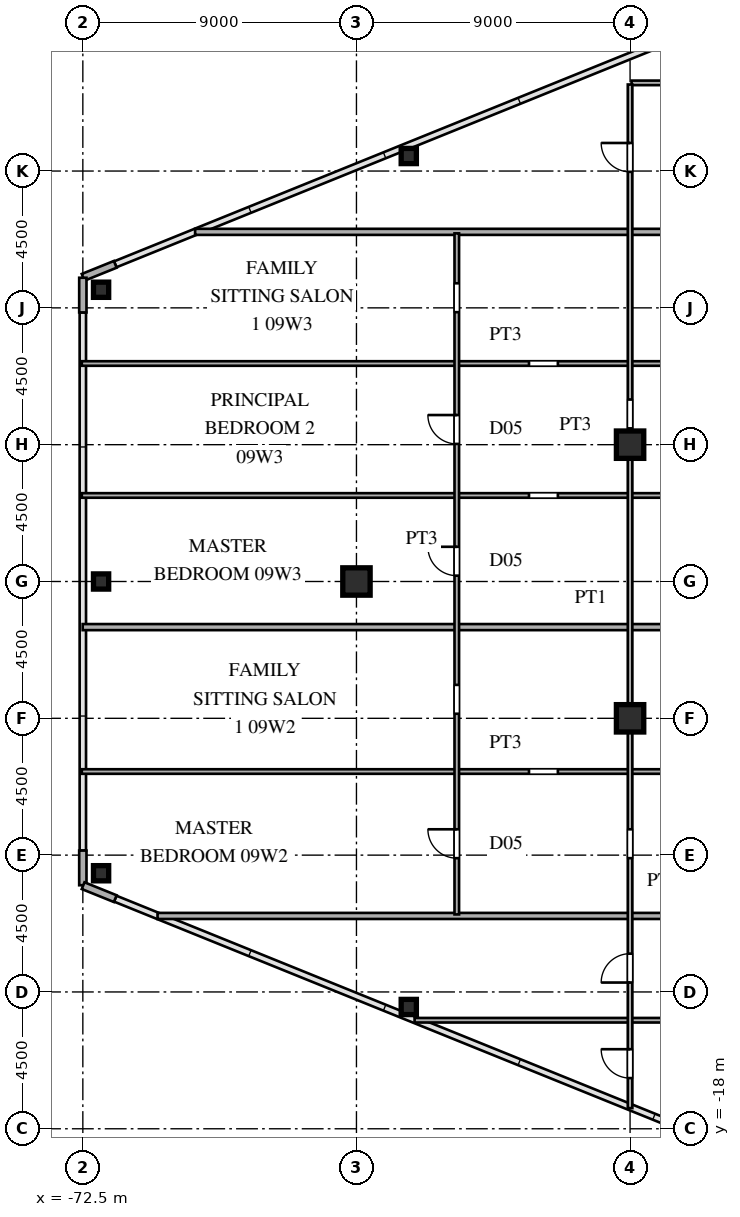
"""IFC4 building model, lengths in metres.
Left out: names, types, materials, properties, quantities, classifications, styles, units other than length and angle.
Written with IfcOpenShell. Run it as: python <this file> out.ifc"""

import sys

from ifc_helpers import new_model, si_unit, direction, frame, frame_2d, origin, origin_2d, place, context, subcontext, project, spatial, rectangle, hollow_rectangle, i_section, extrude, source, transform, mapped, element, fill, save


model = new_model("IFC4")
c1 = context("Model", 3, precision=1e-05, world=origin(), true_north=direction((0.0, 1.0)))
c2 = subcontext(c1, "Body", "Model", "MODEL_VIEW")
j1 = project(units=[si_unit("LENGTHUNIT", "METRE"), si_unit("PLANEANGLEUNIT", "RADIAN")], contexts=[c1])
p1 = place(None, origin())
s1 = spatial("IfcSite", under=j1, at=p1, CompositionType="ELEMENT")
p2 = place(p1, origin())
s2 = spatial("IfcBuilding", under=s1, at=p2, CompositionType="ELEMENT")
p3 = place(p2, frame((0.0, 0.0, 36.9)))
s3 = spatial("IfcBuildingStorey", under=s2, at=p3, CompositionType="ELEMENT", Elevation=36.9)
m1 = source(origin(), c2, "Body", "SweptSolid", [
    extrude(i_section(OverallWidth=0.9, OverallDepth=0.9, WebThickness=0.036, FlangeThickness=0.055, at=origin_2d()), origin(), (0.0, 0.0, 1.0), 3.6),
])
for number, where, z_axis, x_axis in (
    (1, (-54.5, -4.5, 0.0), (0.0, 0.0, 1.0), (1.0, 0.0, 0.0)),
    (2, (-54.5, 4.5, 0.0), (0.0, 0.0, 1.0), (1.0, 0.0, 0.0)),
    (3, (-63.5, 0.0, 0.0), (0.0, 0.0, 1.0), (1.0, 0.0, 0.0)),
):
    element("IfcColumn", number, at=place(p3, frame(where, z_axis=z_axis, x_axis=x_axis)), inside=s3, PredefinedType="COLUMN", context=c2, shape_type="MappedRepresentation", body=[
        mapped(m1, transform((0.0, 0.0, 0.0), scale=1.0)),
    ])
m2 = source(origin(), c2, "Body", "SweptSolid", [
    extrude(hollow_rectangle(XDim=0.5, YDim=0.5, WallThickness=0.02, at=origin_2d()), origin(), (0.0, 0.0, 1.0), 3.6),
])
for number, where, z_axis, x_axis in (
    (4, (-71.9, 9.596, 0.0), (0.0, 0.0, 1.0), (1.0, 0.0, 0.0)),
    (5, (-71.9, -9.596, 0.0), (0.0, 0.0, 1.0), (1.0, 0.0, 0.0)),
    (6, (-61.779, -13.994, 0.0), (0.0, 0.0, 1.0), (1.0, 0.0, 0.0)),
    (7, (-61.779, 13.994, 0.0), (0.0, 0.0, 1.0), (1.0, 0.0, 0.0)),
    (8, (-71.9, 0.0, 0.0), (0.0, 0.0, 1.0), (1.0, 0.0, 0.0)),
):
    element("IfcColumn", number, at=place(p3, frame(where, z_axis=z_axis, x_axis=x_axis)), inside=s3, PredefinedType="COLUMN", context=c2, shape_type="MappedRepresentation", body=[
        mapped(m2, transform((0.0, 0.0, 0.0), scale=1.0)),
    ])
for number, where, z_axis, x_axis in (
    (9, (-71.434, 10.431, 0.0), (0.0, 0.0, 1.0), (-0.927, -0.375, 0.0)),
    (10, (-72.5, 9.99, 0.0), (0.0, 0.0, 1.0), (0.0, -1.0, 0.0)),
    (11, (-72.5, -8.85, 0.0), (0.0, 0.0, 1.0), (0.0, -1.0, 0.0)),
    (12, (-72.491, -10.004, 0.0), (0.0, 0.0, 1.0), (0.927, -0.375, 0.0)),
):
    element("IfcWall", number, at=place(p3, frame(where, z_axis=z_axis, x_axis=x_axis)), inside=s3, PredefinedType="SOLIDWALL", context=c2, shape_type="SweptSolid", body=[
        extrude(rectangle(XDim=1.14, YDim=0.24, at=frame_2d((0.57, 0.0))), origin(), (0.0, 0.0, 1.0), 3.38),
    ])
p4 = place(p3, frame((-61.588, -14.43, 0.0), z_axis=(0.0, 0.0, 1.0), x_axis=(1.0, 0.0, 0.0)))
e13 = element("IfcWall", 13, at=p4, inside=s3, PredefinedType="PARTITIONING", context=c2, shape_type="SweptSolid", body=[
    extrude(rectangle(XDim=16.938, YDim=0.15, at=frame_2d((8.469, 0.0))), origin(), (0.0, 0.0, 1.0), 3.38),
])
p5 = place(p4, frame((11.563, 0.0, 0.0)))
e14 = element("IfcOpeningElement", 14, at=p5, cuts=e13, PredefinedType="OPENING", context=c2, shape_type="SweptSolid", body=[
    extrude(rectangle(XDim=0.95, YDim=2.15, at=frame_2d((0.475, 1.075))), frame((0.0, 0.085, 0.0), z_axis=(0.0, -1.0, 0.0), x_axis=(1.0, 0.0, 0.0)), (0.0, 0.0, 1.0), 0.17),
])
p6 = place(p3, frame((-70.043, -11.0, 0.0), z_axis=(0.0, 0.0, 1.0), x_axis=(1.0, 0.0, 0.0)))
e15 = element("IfcWall", 15, at=p6, inside=s3, PredefinedType="PARTITIONING", context=c2, shape_type="SweptSolid", body=[
    extrude(rectangle(XDim=30.963, YDim=0.2, at=frame_2d((15.481, 0.0))), origin(), (0.0, 0.0, 1.0), 3.38),
])
p7 = place(p3, frame((-72.535, -6.25, 0.0), z_axis=(0.0, 0.0, 1.0), x_axis=(1.0, 0.0, 0.0)))
e16 = element("IfcWall", 16, at=p7, inside=s3, PredefinedType="PARTITIONING", context=c2, shape_type="SweptSolid", body=[
    extrude(rectangle(XDim=27.885, YDim=0.15, at=frame_2d((13.942, 0.0))), origin(), (0.0, 0.0, 1.0), 3.38),
])
p8 = place(p7, frame((14.71, 0.0, 0.0)))
e17 = element("IfcOpeningElement", 17, at=p8, cuts=e16, PredefinedType="OPENING", context=c2, shape_type="SweptSolid", body=[
    extrude(rectangle(XDim=0.95, YDim=2.15, at=frame_2d((0.475, 1.075))), frame((0.0, 0.085, 0.0), z_axis=(0.0, -1.0, 0.0), x_axis=(1.0, 0.0, 0.0)), (0.0, 0.0, 1.0), 0.17),
])
p9 = place(p3, frame((-72.505, -1.5, 0.0), z_axis=(0.0, 0.0, 1.0), x_axis=(1.0, 0.0, 0.0)))
e18 = element("IfcWall", 18, at=p9, inside=s3, PredefinedType="PARTITIONING", context=c2, shape_type="SweptSolid", body=[
    extrude(rectangle(XDim=33.425, YDim=0.2, at=frame_2d((16.712, 0.0))), origin(), (0.0, 0.0, 1.0), 3.38),
])
p10 = place(p3, frame((-72.535, 2.83, 0.0), z_axis=(0.0, 0.0, 1.0), x_axis=(1.0, 0.0, 0.0)))
e19 = element("IfcWall", 19, at=p10, inside=s3, PredefinedType="PARTITIONING", context=c2, shape_type="SweptSolid", body=[
    extrude(rectangle(XDim=27.885, YDim=0.15, at=frame_2d((13.942, 0.0))), origin(), (0.0, 0.0, 1.0), 3.38),
])
p11 = place(p10, frame((22.51, 0.0, 0.0)))
e20 = element("IfcOpeningElement", 20, at=p11, cuts=e19, PredefinedType="OPENING", context=c2, shape_type="SweptSolid", body=[
    extrude(rectangle(XDim=0.95, YDim=2.15, at=frame_2d((0.475, 1.075))), frame((0.0, 0.085, 0.0), z_axis=(0.0, -1.0, 0.0), x_axis=(1.0, 0.0, 0.0)), (0.0, 0.0, 1.0), 0.17),
])
p12 = place(p10, frame((14.71, 0.0, 0.0)))
e21 = element("IfcOpeningElement", 21, at=p12, cuts=e19, PredefinedType="OPENING", context=c2, shape_type="SweptSolid", body=[
    extrude(rectangle(XDim=0.95, YDim=2.15, at=frame_2d((0.475, 1.075))), frame((0.0, 0.085, 0.0), z_axis=(0.0, -1.0, 0.0), x_axis=(1.0, 0.0, 0.0)), (0.0, 0.0, 1.0), 0.17),
])
p13 = place(p3, frame((-72.535, 7.17, 0.0), z_axis=(0.0, 0.0, 1.0), x_axis=(1.0, 0.0, 0.0)))
e22 = element("IfcWall", 22, at=p13, inside=s3, PredefinedType="PARTITIONING", context=c2, shape_type="SweptSolid", body=[
    extrude(rectangle(XDim=27.885, YDim=0.15, at=frame_2d((13.942, 0.0))), origin(), (0.0, 0.0, 1.0), 3.38),
])
p14 = place(p13, frame((22.51, 0.0, 0.0)))
e23 = element("IfcOpeningElement", 23, at=p14, cuts=e22, PredefinedType="OPENING", context=c2, shape_type="SweptSolid", body=[
    extrude(rectangle(XDim=0.95, YDim=2.15, at=frame_2d((0.475, 1.075))), frame((0.0, 0.085, 0.0), z_axis=(0.0, -1.0, 0.0), x_axis=(1.0, 0.0, 0.0)), (0.0, 0.0, 1.0), 0.17),
])
p15 = place(p13, frame((14.71, 0.0, 0.0)))
e24 = element("IfcOpeningElement", 24, at=p15, cuts=e22, PredefinedType="OPENING", context=c2, shape_type="SweptSolid", body=[
    extrude(rectangle(XDim=0.95, YDim=2.15, at=frame_2d((0.475, 1.075))), frame((0.0, 0.085, 0.0), z_axis=(0.0, -1.0, 0.0), x_axis=(1.0, 0.0, 0.0)), (0.0, 0.0, 1.0), 0.17),
])
p16 = place(p3, frame((-68.807, 11.5, 0.0), z_axis=(0.0, 0.0, 1.0), x_axis=(1.0, 0.0, 0.0)))
e25 = element("IfcWall", 25, at=p16, inside=s3, PredefinedType="PARTITIONING", context=c2, shape_type="SweptSolid", body=[
    extrude(rectangle(XDim=29.727, YDim=0.2, at=frame_2d((14.863, 0.0))), origin(), (0.0, 0.0, 1.0), 3.38),
])
p17 = place(p3, frame((-54.45, 16.4, 0.0), z_axis=(0.0, 0.0, 1.0), x_axis=(1.0, 0.0, 0.0)))
e26 = element("IfcWall", 26, at=p17, inside=s3, PredefinedType="PARTITIONING", context=c2, shape_type="SweptSolid", body=[
    extrude(rectangle(XDim=9.8, YDim=0.15, at=frame_2d((4.9, 0.0))), origin(), (0.0, 0.0, 1.0), 3.38),
])
p18 = place(p17, frame((4.425, 0.0, 0.0)))
e27 = element("IfcOpeningElement", 27, at=p18, cuts=e26, PredefinedType="OPENING", context=c2, shape_type="SweptSolid", body=[
    extrude(rectangle(XDim=0.95, YDim=2.15, at=frame_2d((0.475, 1.075))), frame((0.0, 0.085, 0.0), z_axis=(0.0, -1.0, 0.0), x_axis=(1.0, 0.0, 0.0)), (0.0, 0.0, 1.0), 0.17),
])
p19 = place(p3, frame((-60.2, -10.95, 0.0), z_axis=(0.0, 0.0, 1.0), x_axis=(0.0, 1.0, 0.0)))
e28 = element("IfcWall", 28, at=p19, inside=s3, PredefinedType="PARTITIONING", context=c2, shape_type="SweptSolid", body=[
    extrude(rectangle(XDim=22.4, YDim=0.15, at=frame_2d((11.2, 0.0))), origin(), (0.0, 0.0, 1.0), 3.38),
])
p20 = place(p19, frame((1.85, 0.0, 0.0)))
e29 = element("IfcOpeningElement", 29, at=p20, cuts=e28, PredefinedType="OPENING", context=c2, shape_type="SweptSolid", body=[
    extrude(rectangle(XDim=0.95, YDim=2.15, at=frame_2d((0.475, 1.075))), frame((0.0, 0.085, 0.0), z_axis=(0.0, -1.0, 0.0), x_axis=(1.0, 0.0, 0.0)), (0.0, 0.0, 1.0), 0.17),
])
p21 = place(p19, frame((6.6, 0.0, 0.0)))
e30 = element("IfcOpeningElement", 30, at=p21, cuts=e28, PredefinedType="OPENING", context=c2, shape_type="SweptSolid", body=[
    extrude(rectangle(XDim=0.95, YDim=2.15, at=frame_2d((0.475, 1.075))), frame((0.0, 0.085, 0.0), z_axis=(0.0, -1.0, 0.0), x_axis=(1.0, 0.0, 0.0)), (0.0, 0.0, 1.0), 0.17),
])
p22 = place(p19, frame((11.142, 0.0, 0.0)))
e31 = element("IfcOpeningElement", 31, at=p22, cuts=e28, PredefinedType="OPENING", context=c2, shape_type="SweptSolid", body=[
    extrude(rectangle(XDim=0.95, YDim=2.15, at=frame_2d((0.475, 1.075))), frame((0.0, 0.085, 0.0), z_axis=(0.0, -1.0, 0.0), x_axis=(1.0, 0.0, 0.0)), (0.0, 0.0, 1.0), 0.17),
])
p23 = place(p19, frame((15.475, 0.0, 0.0)))
e32 = element("IfcOpeningElement", 32, at=p23, cuts=e28, PredefinedType="OPENING", context=c2, shape_type="SweptSolid", body=[
    extrude(rectangle(XDim=0.95, YDim=2.15, at=frame_2d((0.475, 1.075))), frame((0.0, 0.085, 0.0), z_axis=(0.0, -1.0, 0.0), x_axis=(1.0, 0.0, 0.0)), (0.0, 0.0, 1.0), 0.17),
])
p24 = place(p19, frame((19.808, 0.0, 0.0)))
e33 = element("IfcOpeningElement", 33, at=p24, cuts=e28, PredefinedType="OPENING", context=c2, shape_type="SweptSolid", body=[
    extrude(rectangle(XDim=0.95, YDim=2.15, at=frame_2d((0.475, 1.075))), frame((0.0, 0.085, 0.0), z_axis=(0.0, -1.0, 0.0), x_axis=(1.0, 0.0, 0.0)), (0.0, 0.0, 1.0), 0.17),
])
p25 = place(p3, frame((-54.5, -17.321, 0.0), z_axis=(0.0, 0.0, 1.0), x_axis=(0.0, 1.0, 0.0)))
e34 = element("IfcWall", 34, at=p25, inside=s3, PredefinedType="PARTITIONING", context=c2, shape_type="SweptSolid", body=[
    extrude(rectangle(XDim=33.667, YDim=0.15, at=frame_2d((16.833, 0.0))), origin(), (0.0, 0.0, 1.0), 2.68),
])
p26 = place(p25, frame((0.988, 0.0, 0.0)))
e35 = element("IfcOpeningElement", 35, at=p26, cuts=e34, PredefinedType="OPENING", context=c2, shape_type="SweptSolid", body=[
    extrude(rectangle(XDim=0.95, YDim=2.15, at=frame_2d((0.475, 1.075))), frame((0.0, 0.085, 0.0), z_axis=(0.0, -1.0, 0.0), x_axis=(1.0, 0.0, 0.0)), (0.0, 0.0, 1.0), 0.17),
])
p27 = place(p25, frame((4.131, 0.0, 0.0)))
e36 = element("IfcOpeningElement", 36, at=p27, cuts=e34, PredefinedType="OPENING", context=c2, shape_type="SweptSolid", body=[
    extrude(rectangle(XDim=0.95, YDim=2.15, at=frame_2d((0.475, 1.075))), frame((0.0, 0.085, 0.0), z_axis=(0.0, -1.0, 0.0), x_axis=(1.0, 0.0, 0.0)), (0.0, 0.0, 1.0), 0.17),
])
p28 = place(p25, frame((8.221, 0.0, 0.0)))
e37 = element("IfcOpeningElement", 37, at=p28, cuts=e34, PredefinedType="OPENING", context=c2, shape_type="SweptSolid", body=[
    extrude(rectangle(XDim=0.95, YDim=2.15, at=frame_2d((0.475, 1.075))), frame((0.0, 0.085, 0.0), z_axis=(0.0, -1.0, 0.0), x_axis=(1.0, 0.0, 0.0)), (0.0, 0.0, 1.0), 0.17),
])
p29 = place(p25, frame((22.357, 0.0, 0.0)))
e38 = element("IfcOpeningElement", 38, at=p29, cuts=e34, PredefinedType="OPENING", context=c2, shape_type="SweptSolid", body=[
    extrude(rectangle(XDim=0.95, YDim=2.15, at=frame_2d((0.475, 1.075))), frame((0.0, 0.085, 0.0), z_axis=(0.0, -1.0, 0.0), x_axis=(1.0, 0.0, 0.0)), (0.0, 0.0, 1.0), 0.17),
])
p30 = place(p25, frame((30.794, 0.0, 0.0)))
e39 = element("IfcOpeningElement", 39, at=p30, cuts=e34, PredefinedType="OPENING", context=c2, shape_type="SweptSolid", body=[
    extrude(rectangle(XDim=0.95, YDim=2.15, at=frame_2d((0.475, 1.075))), frame((0.0, 0.085, 0.0), z_axis=(0.0, -1.0, 0.0), x_axis=(1.0, 0.0, 0.0)), (0.0, 0.0, 1.0), 0.17),
])
m3 = source(origin(), c2, "Body", "SweptSolid", [
    extrude(rectangle(XDim=0.95, YDim=2.15, at=frame_2d((0.475, 1.075))), frame((0.0, 0.025, 0.0), z_axis=(0.0, -1.0, 0.0), x_axis=(1.0, 0.0, 0.0)), (0.0, 0.0, 1.0), 0.05),
])
p31 = place(p20, origin())
e40 = element("IfcDoor", 40, at=p31, inside=s3, OperationType="SINGLE_SWING_RIGHT", PredefinedType="DOOR", context=c2, shape_type="MappedRepresentation", body=[
    mapped(m3, transform((0.0, 0.0, 0.0), scale=1.0)),
])
fill(e29, e40)
p32 = place(p22, origin())
e41 = element("IfcDoor", 41, at=p32, inside=s3, OperationType="SINGLE_SWING_RIGHT", PredefinedType="DOOR", context=c2, shape_type="MappedRepresentation", body=[
    mapped(m3, transform((0.0, 0.0, 0.0), scale=1.0)),
])
fill(e31, e41)
p33 = place(p23, origin())
e42 = element("IfcDoor", 42, at=p33, inside=s3, OperationType="SINGLE_SWING_RIGHT", PredefinedType="DOOR", context=c2, shape_type="MappedRepresentation", body=[
    mapped(m3, transform((0.0, 0.0, 0.0), scale=1.0)),
])
fill(e32, e42)
p34 = place(p26, origin())
e43 = element("IfcDoor", 43, at=p34, inside=s3, OperationType="SINGLE_SWING_RIGHT", PredefinedType="DOOR", context=c2, shape_type="MappedRepresentation", body=[
    mapped(m3, transform((0.0, 0.0, 0.0), scale=1.0)),
])
fill(e35, e43)
p35 = place(p27, origin())
e44 = element("IfcDoor", 44, at=p35, inside=s3, OperationType="SINGLE_SWING_LEFT", PredefinedType="DOOR", context=c2, shape_type="MappedRepresentation", body=[
    mapped(m3, transform((0.0, 0.0, 0.0), scale=1.0)),
])
fill(e36, e44)
p36 = place(p30, origin())
e45 = element("IfcDoor", 45, at=p36, inside=s3, OperationType="SINGLE_SWING_RIGHT", PredefinedType="DOOR", context=c2, shape_type="MappedRepresentation", body=[
    mapped(m3, transform((0.0, 0.0, 0.0), scale=1.0)),
])
fill(e39, e45)
save(model, sys.argv[1])
